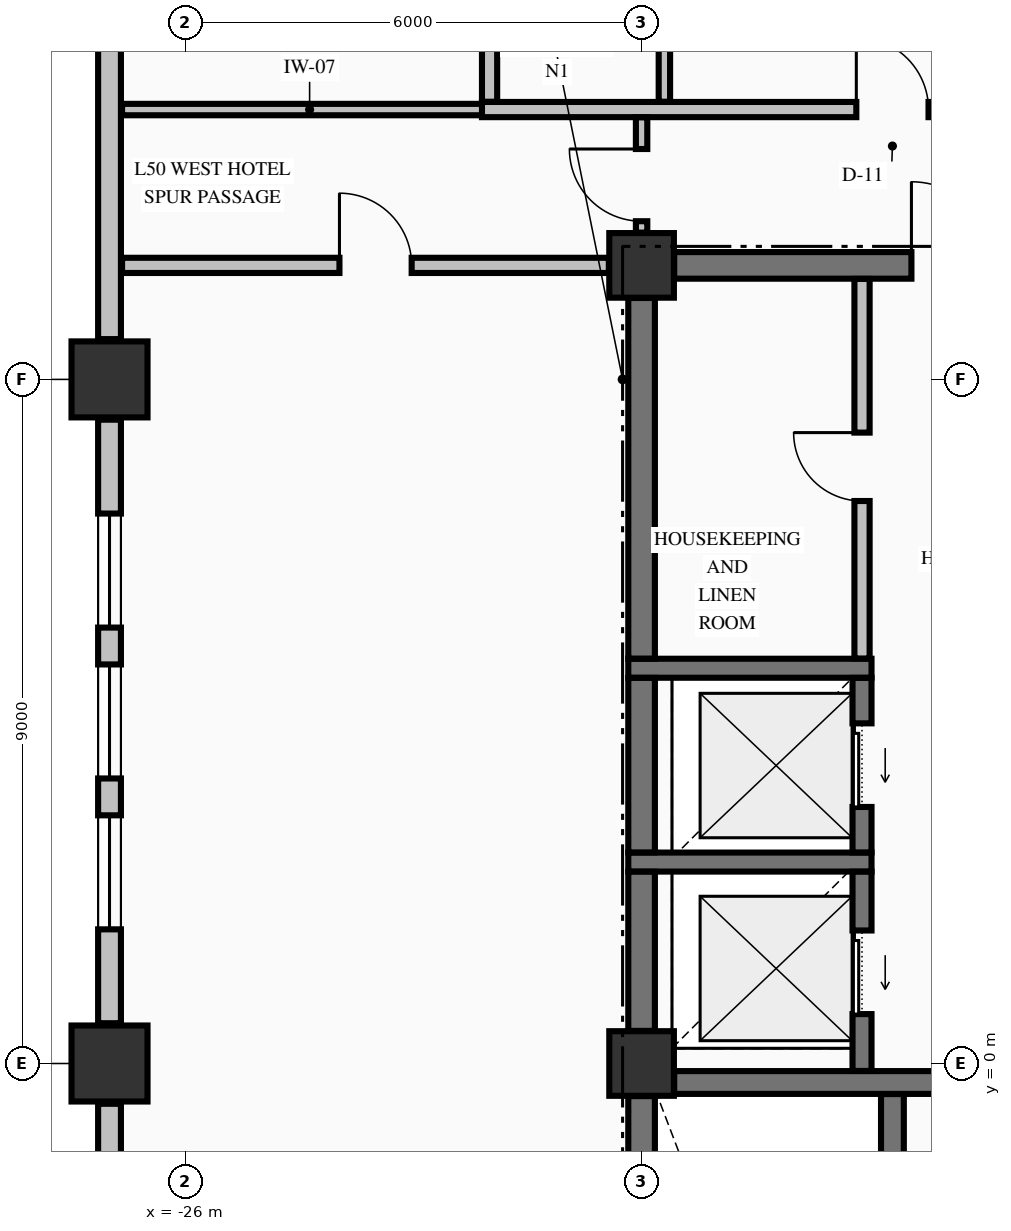
"""IFC4 building model, lengths in metres.
Left out: names, types, materials, properties, quantities, classifications, styles, units other than length and angle.
Written with IfcOpenShell. Run it as: python <this file> out.ifc"""

import sys

from ifc_helpers import new_model, si_unit, direction, frame, frame_2d, origin, origin_2d, place, context, subcontext, project, spatial, rectangle, extrude, element, fill, save


model = new_model("IFC4")
c1 = context("Model", 3, precision=1e-05, world=origin(), true_north=direction((0.0, 1.0)))
c2 = subcontext(c1, "Body", "Model", "MODEL_VIEW")
j1 = project(units=[si_unit("LENGTHUNIT", "METRE"), si_unit("PLANEANGLEUNIT", "RADIAN")], contexts=[c1])
p1 = place(None, origin())
s1 = spatial("IfcSite", under=j1, at=p1, CompositionType="ELEMENT")
p2 = place(p1, origin())
s2 = spatial("IfcBuilding", under=s1, at=p2, CompositionType="ELEMENT")
p3 = place(p2, frame((0.0, 0.0, 194.86)))
s3 = spatial("IfcBuildingStorey", under=s2, at=p3, CompositionType="ELEMENT", Elevation=194.86)
for number, where, z_axis, x_axis in (
    (1, (-27.0, 0.0, -0.275), (0.0, 0.0, 1.0), (1.0, 0.0, 0.0)),
    (2, (-27.0, 9.0, -0.275), (0.0, 0.0, 1.0), (1.0, 0.0, 0.0)),
):
    element("IfcColumn", number, at=place(p3, frame(where, z_axis=z_axis, x_axis=x_axis)), inside=s3, PredefinedType="COLUMN", context=c2, shape_type="SweptSolid", body=[
        extrude(rectangle(XDim=1.0, YDim=1.0, at=origin_2d()), origin(), (0.0, 0.0, 1.0), 3.425),
    ])
for number, where, z_axis, x_axis in (
    (3, (-20.0, 10.5, -0.275), (0.0, 0.0, 1.0), (1.0, 0.0, 0.0)),
    (4, (-20.0, 0.0, -0.275), (0.0, 0.0, 1.0), (1.0, 0.0, 0.0)),
):
    element("IfcColumn", number, at=place(p3, frame(where, z_axis=z_axis, x_axis=x_axis)), inside=s3, PredefinedType="COLUMN", context=c2, shape_type="SweptSolid", body=[
        extrude(rectangle(XDim=0.85, YDim=0.85, at=origin_2d()), origin(), (0.0, 0.0, 1.0), 3.425),
    ])
p4 = place(p3, frame((-27.0, -0.53, 0.0), z_axis=(0.0, 0.0, 1.0), x_axis=(0.0, -1.0, 0.0)))
e5 = element("IfcWall", 5, at=p4, inside=s3, PredefinedType="STANDARD", context=c2, shape_type="SweptSolid", body=[
    extrude(rectangle(XDim=7.94, YDim=0.3, at=frame_2d((3.97, 0.0))), origin(), (0.0, 0.0, 1.0), 2.542),
])
p5 = place(p4, frame((1.235, 0.0, 0.72)))
e6 = element("IfcOpeningElement", 6, at=p5, cuts=e5, PredefinedType="OPENING", context=c2, shape_type="SweptSolid", body=[
    extrude(rectangle(XDim=1.5, YDim=1.6, at=frame_2d((0.75, 0.8))), frame((0.0, 0.16, 0.0), z_axis=(0.0, -1.0, 0.0), x_axis=(1.0, 0.0, 0.0)), (0.0, 0.0, 1.0), 0.32),
])
p6 = place(p4, frame((3.22, 0.0, 0.72)))
e7 = element("IfcOpeningElement", 7, at=p6, cuts=e5, PredefinedType="OPENING", context=c2, shape_type="SweptSolid", body=[
    extrude(rectangle(XDim=1.5, YDim=1.6, at=frame_2d((0.75, 0.8))), frame((0.0, 0.16, 0.0), z_axis=(0.0, -1.0, 0.0), x_axis=(1.0, 0.0, 0.0)), (0.0, 0.0, 1.0), 0.32),
])
p7 = place(p4, frame((5.205, 0.0, 0.72)))
e8 = element("IfcOpeningElement", 8, at=p7, cuts=e5, PredefinedType="OPENING", context=c2, shape_type="SweptSolid", body=[
    extrude(rectangle(XDim=1.5, YDim=1.6, at=frame_2d((0.75, 0.8))), frame((0.0, 0.16, 0.0), z_axis=(0.0, -1.0, 0.0), x_axis=(1.0, 0.0, 0.0)), (0.0, 0.0, 1.0), 0.32),
])
p8 = place(p3, frame((-27.0, 8.47, 0.0), z_axis=(0.0, 0.0, 1.0), x_axis=(0.0, -1.0, 0.0)))
e9 = element("IfcWall", 9, at=p8, inside=s3, PredefinedType="STANDARD", context=c2, shape_type="SweptSolid", body=[
    extrude(rectangle(XDim=7.94, YDim=0.3, at=frame_2d((3.97, 0.0))), origin(), (0.0, 0.0, 1.0), 2.542),
])
p9 = place(p8, frame((1.235, 0.0, 0.72)))
e10 = element("IfcOpeningElement", 10, at=p9, cuts=e9, PredefinedType="OPENING", context=c2, shape_type="SweptSolid", body=[
    extrude(rectangle(XDim=1.5, YDim=1.6, at=frame_2d((0.75, 0.8))), frame((0.0, 0.16, 0.0), z_axis=(0.0, -1.0, 0.0), x_axis=(1.0, 0.0, 0.0)), (0.0, 0.0, 1.0), 0.32),
])
p10 = place(p8, frame((3.22, 0.0, 0.72)))
e11 = element("IfcOpeningElement", 11, at=p10, cuts=e9, PredefinedType="OPENING", context=c2, shape_type="SweptSolid", body=[
    extrude(rectangle(XDim=1.5, YDim=1.6, at=frame_2d((0.75, 0.8))), frame((0.0, 0.16, 0.0), z_axis=(0.0, -1.0, 0.0), x_axis=(1.0, 0.0, 0.0)), (0.0, 0.0, 1.0), 0.32),
])
p11 = place(p8, frame((5.205, 0.0, 0.72)))
e12 = element("IfcOpeningElement", 12, at=p11, cuts=e9, PredefinedType="OPENING", context=c2, shape_type="SweptSolid", body=[
    extrude(rectangle(XDim=1.5, YDim=1.6, at=frame_2d((0.75, 0.8))), frame((0.0, 0.16, 0.0), z_axis=(0.0, -1.0, 0.0), x_axis=(1.0, 0.0, 0.0)), (0.0, 0.0, 1.0), 0.32),
])
p12 = place(p3, frame((-27.0, 18.97, 0.0), z_axis=(0.0, 0.0, 1.0), x_axis=(0.0, -1.0, 0.0)))
e13 = element("IfcWall", 13, at=p12, inside=s3, PredefinedType="STANDARD", context=c2, shape_type="SweptSolid", body=[
    extrude(rectangle(XDim=9.44, YDim=0.3, at=frame_2d((4.72, 0.0))), origin(), (0.0, 0.0, 1.0), 2.542),
])
p13 = place(p3, frame((-19.571, -0.25, 0.0), z_axis=(0.0, 0.0, 1.0), x_axis=(1.0, 0.0, 0.0)))
e14 = element("IfcWall", 14, at=p13, inside=s3, PredefinedType="SHEAR", context=c2, shape_type="SweptSolid", body=[
    extrude(rectangle(XDim=8.142, YDim=0.3, at=frame_2d((4.071, 0.0))), origin(), (0.0, 0.0, 1.0), 3.15),
])
p14 = place(p13, frame((5.871, 0.0, 0.0)))
e15 = element("IfcOpeningElement", 15, at=p14, cuts=e14, PredefinedType="OPENING", context=c2, shape_type="SweptSolid", body=[
    extrude(rectangle(XDim=1.1, YDim=2.15, at=frame_2d((0.55, 1.075))), frame((0.0, 0.16, 0.0), z_axis=(0.0, -1.0, 0.0), x_axis=(1.0, 0.0, 0.0)), (0.0, 0.0, 1.0), 0.32),
])
for number, where, z_axis, x_axis in (
    (16, (-20.175, 2.65, 0.0), (0.0, 0.0, 1.0), (1.0, 0.0, 0.0)),
    (17, (-20.175, 5.2, 0.0), (0.0, 0.0, 1.0), (1.0, 0.0, 0.0)),
):
    element("IfcWall", number, at=place(p3, frame(where, z_axis=z_axis, x_axis=x_axis)), inside=s3, PredefinedType="SOLIDWALL", context=c2, shape_type="SweptSolid", body=[
        extrude(rectangle(XDim=3.2, YDim=0.25, at=frame_2d((1.6, 0.0))), origin(), (0.0, 0.0, 1.0), 3.15),
    ])
p15 = place(p3, frame((-19.571, 10.5, 0.0), z_axis=(0.0, 0.0, 1.0), x_axis=(1.0, 0.0, 0.0)))
e18 = element("IfcWall", 18, at=p15, inside=s3, PredefinedType="SHEAR", context=c2, shape_type="SweptSolid", body=[
    extrude(rectangle(XDim=4.871, YDim=0.35, at=frame_2d((2.436, 0.0))), origin(), (0.0, 0.0, 1.0), 3.15),
])
p16 = place(p15, frame((3.121, 0.0, 0.0)))
e19 = element("IfcOpeningElement", 19, at=p16, cuts=e18, PredefinedType="OPENING", context=c2, shape_type="SweptSolid", body=[
    extrude(rectangle(XDim=1.1, YDim=2.15, at=frame_2d((0.55, 1.075))), frame((0.0, 0.185, 0.0), z_axis=(0.0, -1.0, 0.0), x_axis=(1.0, 0.0, 0.0)), (0.0, 0.0, 1.0), 0.37),
])
p17 = place(p3, frame((-26.835, 10.5, 0.0), z_axis=(0.0, 0.0, 1.0), x_axis=(1.0, 0.0, 0.0)))
e20 = element("IfcWall", 20, at=p17, inside=s3, PredefinedType="PARTITIONING", context=c2, shape_type="SweptSolid", body=[
    extrude(rectangle(XDim=6.404, YDim=0.2, at=frame_2d((3.202, 0.0))), origin(), (0.0, 0.0, 1.0), 3.15),
])
p18 = place(p17, frame((2.86, 0.0, 0.0)))
e21 = element("IfcOpeningElement", 21, at=p18, cuts=e20, PredefinedType="OPENING", context=c2, shape_type="SweptSolid", body=[
    extrude(rectangle(XDim=0.95, YDim=2.15, at=frame_2d((0.475, 1.075))), frame((0.0, 0.11, 0.0), z_axis=(0.0, -1.0, 0.0), x_axis=(1.0, 0.0, 0.0)), (0.0, 0.0, 1.0), 0.22),
])
p19 = place(p3, frame((-26.835, 12.55, 0.0), z_axis=(0.0, 0.0, 1.0), x_axis=(1.0, 0.0, 0.0)))
e22 = element("IfcWall", 22, at=p19, inside=s3, PredefinedType="PARTITIONING", context=c2, shape_type="SweptSolid", body=[
    extrude(rectangle(XDim=4.935, YDim=0.15, at=frame_2d((2.468, 0.0))), origin(), (0.0, 0.0, 1.0), 3.15),
])
p20 = place(p3, frame((-22.1, 12.55, 0.0), z_axis=(0.0, 0.0, 1.0), x_axis=(1.0, 0.0, 0.0)))
e23 = element("IfcWall", 23, at=p20, inside=s3, PredefinedType="PARTITIONING", context=c2, shape_type="SweptSolid", body=[
    extrude(rectangle(XDim=39.2, YDim=0.2, at=frame_2d((19.6, 0.0))), origin(), (0.0, 0.0, 1.0), 3.15),
])
p21 = place(p20, frame((4.925, 0.0, 0.0)))
e24 = element("IfcOpeningElement", 24, at=p21, cuts=e23, PredefinedType="OPENING", context=c2, shape_type="SweptSolid", body=[
    extrude(rectangle(XDim=0.95, YDim=2.15, at=frame_2d((0.475, 1.075))), frame((0.0, 0.11, 0.0), z_axis=(0.0, -1.0, 0.0), x_axis=(1.0, 0.0, 0.0)), (0.0, 0.0, 1.0), 0.22),
])
p22 = place(p20, frame((12.375, 0.0, 0.0)))
e25 = element("IfcOpeningElement", 25, at=p22, cuts=e23, PredefinedType="OPENING", context=c2, shape_type="SweptSolid", body=[
    extrude(rectangle(XDim=0.95, YDim=2.15, at=frame_2d((0.475, 1.075))), frame((0.0, 0.11, 0.0), z_axis=(0.0, -1.0, 0.0), x_axis=(1.0, 0.0, 0.0)), (0.0, 0.0, 1.0), 0.22),
])
p23 = place(p20, frame((18.575, 0.0, 0.0)))
e26 = element("IfcOpeningElement", 26, at=p23, cuts=e23, PredefinedType="OPENING", context=c2, shape_type="SweptSolid", body=[
    extrude(rectangle(XDim=0.95, YDim=2.15, at=frame_2d((0.475, 1.075))), frame((0.0, 0.11, 0.0), z_axis=(0.0, -1.0, 0.0), x_axis=(1.0, 0.0, 0.0)), (0.0, 0.0, 1.0), 0.22),
])
p24 = place(p20, frame((24.475, 0.0, 0.0)))
e27 = element("IfcOpeningElement", 27, at=p24, cuts=e23, PredefinedType="OPENING", context=c2, shape_type="SweptSolid", body=[
    extrude(rectangle(XDim=0.95, YDim=2.15, at=frame_2d((0.475, 1.075))), frame((0.0, 0.11, 0.0), z_axis=(0.0, -1.0, 0.0), x_axis=(1.0, 0.0, 0.0)), (0.0, 0.0, 1.0), 0.22),
])
p25 = place(p20, frame((30.375, 0.0, 0.0)))
e28 = element("IfcOpeningElement", 28, at=p25, cuts=e23, PredefinedType="OPENING", context=c2, shape_type="SweptSolid", body=[
    extrude(rectangle(XDim=0.95, YDim=2.15, at=frame_2d((0.475, 1.075))), frame((0.0, 0.11, 0.0), z_axis=(0.0, -1.0, 0.0), x_axis=(1.0, 0.0, 0.0)), (0.0, 0.0, 1.0), 0.22),
])
p26 = place(p20, frame((36.525, 0.0, 0.0)))
e29 = element("IfcOpeningElement", 29, at=p26, cuts=e23, PredefinedType="OPENING", context=c2, shape_type="SweptSolid", body=[
    extrude(rectangle(XDim=0.95, YDim=2.15, at=frame_2d((0.475, 1.075))), frame((0.0, 0.11, 0.0), z_axis=(0.0, -1.0, 0.0), x_axis=(1.0, 0.0, 0.0)), (0.0, 0.0, 1.0), 0.22),
])
p27 = place(p3, frame((-20.0, -9.521, 0.0), z_axis=(0.0, 0.0, 1.0), x_axis=(0.0, 1.0, 0.0)))
e30 = element("IfcWall", 30, at=p27, inside=s3, PredefinedType="SHEAR", context=c2, shape_type="SweptSolid", body=[
    extrude(rectangle(XDim=9.092, YDim=0.35, at=frame_2d((4.546, 0.0))), origin(), (0.0, 0.0, 1.0), 3.15),
])
p28 = place(p3, frame((-20.0, 0.429, 0.0), z_axis=(0.0, 0.0, 1.0), x_axis=(0.0, 1.0, 0.0)))
e31 = element("IfcWall", 31, at=p28, inside=s3, PredefinedType="SHEAR", context=c2, shape_type="SweptSolid", body=[
    extrude(rectangle(XDim=2.094, YDim=0.35, at=frame_2d((1.047, 0.0))), origin(), (0.0, 0.0, 1.0), 3.15),
])
p29 = place(p3, frame((-20.0, 2.777, 0.0), z_axis=(0.0, 0.0, 1.0), x_axis=(0.0, 1.0, 0.0)))
e32 = element("IfcWall", 32, at=p29, inside=s3, PredefinedType="SHEAR", context=c2, shape_type="SweptSolid", body=[
    extrude(rectangle(XDim=2.296, YDim=0.35, at=frame_2d((1.148, 0.0))), origin(), (0.0, 0.0, 1.0), 3.15),
])
p30 = place(p3, frame((-20.0, 5.327, 0.0), z_axis=(0.0, 0.0, 1.0), x_axis=(0.0, 1.0, 0.0)))
e33 = element("IfcWall", 33, at=p30, inside=s3, PredefinedType="SHEAR", context=c2, shape_type="SweptSolid", body=[
    extrude(rectangle(XDim=4.744, YDim=0.35, at=frame_2d((2.372, 0.0))), origin(), (0.0, 0.0, 1.0), 3.15),
])
p31 = place(p3, frame((-17.1, -0.098, 0.0), z_axis=(0.0, 0.0, 1.0), x_axis=(0.0, 1.0, 0.0)))
e34 = element("IfcWall", 34, at=p31, inside=s3, PredefinedType="SOLIDWALL", context=c2, shape_type="SweptSolid", body=[
    extrude(rectangle(XDim=2.621, YDim=0.25, at=frame_2d((1.311, 0.0))), origin(), (0.0, 0.0, 1.0), 3.15),
])
p32 = place(p31, frame((0.748, 0.0, 0.0)))
e35 = element("IfcOpeningElement", 35, at=p32, cuts=e34, PredefinedType="OPENING", context=c2, shape_type="SweptSolid", body=[
    extrude(rectangle(XDim=1.1, YDim=2.2, at=frame_2d((0.55, 1.1))), frame((0.0, 0.135, 0.0), z_axis=(0.0, -1.0, 0.0), x_axis=(1.0, 0.0, 0.0)), (0.0, 0.0, 1.0), 0.27),
])
p33 = place(p3, frame((-17.1, 2.777, 0.0), z_axis=(0.0, 0.0, 1.0), x_axis=(0.0, 1.0, 0.0)))
e36 = element("IfcWall", 36, at=p33, inside=s3, PredefinedType="SOLIDWALL", context=c2, shape_type="SweptSolid", body=[
    extrude(rectangle(XDim=2.296, YDim=0.25, at=frame_2d((1.148, 0.0))), origin(), (0.0, 0.0, 1.0), 3.15),
])
p34 = place(p33, frame((0.598, 0.0, 0.0)))
e37 = element("IfcOpeningElement", 37, at=p34, cuts=e36, PredefinedType="OPENING", context=c2, shape_type="SweptSolid", body=[
    extrude(rectangle(XDim=1.1, YDim=2.2, at=frame_2d((0.55, 1.1))), frame((0.0, 0.135, 0.0), z_axis=(0.0, -1.0, 0.0), x_axis=(1.0, 0.0, 0.0)), (0.0, 0.0, 1.0), 0.27),
])
p35 = place(p3, frame((-16.7, -9.773, 0.0), z_axis=(0.0, 0.0, 1.0), x_axis=(0.0, 1.0, 0.0)))
e38 = element("IfcWall", 38, at=p35, inside=s3, PredefinedType="SHEAR", context=c2, shape_type="SweptSolid", body=[
    extrude(rectangle(XDim=9.371, YDim=0.3, at=frame_2d((4.686, 0.0))), origin(), (0.0, 0.0, 1.0), 3.15),
])
p36 = place(p3, frame((-22.0, 12.653, 0.0), z_axis=(0.0, 0.0, 1.0), x_axis=(0.0, 1.0, 0.0)))
e39 = element("IfcWall", 39, at=p36, inside=s3, PredefinedType="PARTITIONING", context=c2, shape_type="SweptSolid", body=[
    extrude(rectangle(XDim=2.669, YDim=0.2, at=frame_2d((1.334, 0.0))), origin(), (0.0, 0.0, 1.0), 3.15),
])
p37 = place(p3, frame((-20.0, 10.931, 0.0), z_axis=(0.0, 0.0, 1.0), x_axis=(0.0, 1.0, 0.0)))
e40 = element("IfcWall", 40, at=p37, inside=s3, PredefinedType="PARTITIONING", context=c2, shape_type="SweptSolid", body=[
    extrude(rectangle(XDim=1.516, YDim=0.15, at=frame_2d((0.758, 0.0))), origin(), (0.0, 0.0, 1.0), 2.342),
])
p38 = place(p37, frame((0.15, 0.0, 0.0)))
e41 = element("IfcOpeningElement", 41, at=p38, cuts=e40, PredefinedType="OPENING", context=c2, shape_type="SweptSolid", body=[
    extrude(rectangle(XDim=0.95, YDim=2.15, at=frame_2d((0.475, 1.075))), frame((0.0, 0.085, 0.0), z_axis=(0.0, -1.0, 0.0), x_axis=(1.0, 0.0, 0.0)), (0.0, 0.0, 1.0), 0.17),
])
p39 = place(p3, frame((-19.7, 12.653, 0.0), z_axis=(0.0, 0.0, 1.0), x_axis=(0.0, 1.0, 0.0)))
e42 = element("IfcWall", 42, at=p39, inside=s3, PredefinedType="PARTITIONING", context=c2, shape_type="SweptSolid", body=[
    extrude(rectangle(XDim=2.669, YDim=0.15, at=frame_2d((1.334, 0.0))), origin(), (0.0, 0.0, 1.0), 2.342),
])
p40 = place(p3, frame((-17.1, 5.328, 0.0), z_axis=(0.0, 0.0, 1.0), x_axis=(0.0, 1.0, 0.0)))
e43 = element("IfcWall", 43, at=p40, inside=s3, PredefinedType="PARTITIONING", context=c2, shape_type="SweptSolid", body=[
    extrude(rectangle(XDim=4.994, YDim=0.2, at=frame_2d((2.497, 0.0))), origin(), (0.0, 0.0, 1.0), 3.15),
])
p41 = place(p40, frame((2.072, 0.0, 0.0)))
e44 = element("IfcOpeningElement", 44, at=p41, cuts=e43, PredefinedType="OPENING", context=c2, shape_type="SweptSolid", body=[
    extrude(rectangle(XDim=0.9, YDim=2.15, at=frame_2d((0.45, 1.075))), frame((0.0, 0.11, 0.0), z_axis=(0.0, -1.0, 0.0), x_axis=(1.0, 0.0, 0.0)), (0.0, 0.0, 1.0), 0.22),
])
p42 = place(p9, origin())
e45 = element("IfcWindow", 45, at=p42, inside=s3, PartitioningType="SINGLE_PANEL", PredefinedType="WINDOW", context=c2, shape_type="SweptSolid", body=[
    extrude(rectangle(XDim=1.5, YDim=1.6, at=frame_2d((0.75, 0.8))), frame((0.0, 0.03, 0.0), z_axis=(0.0, -1.0, 0.0), x_axis=(1.0, 0.0, 0.0)), (0.0, 0.0, 1.0), 0.06),
])
fill(e10, e45)
p43 = place(p10, origin())
e46 = element("IfcWindow", 46, at=p43, inside=s3, PartitioningType="SINGLE_PANEL", PredefinedType="WINDOW", context=c2, shape_type="SweptSolid", body=[
    extrude(rectangle(XDim=1.5, YDim=1.6, at=frame_2d((0.75, 0.8))), frame((0.0, 0.03, 0.0), z_axis=(0.0, -1.0, 0.0), x_axis=(1.0, 0.0, 0.0)), (0.0, 0.0, 1.0), 0.06),
])
fill(e11, e46)
p44 = place(p11, origin())
e47 = element("IfcWindow", 47, at=p44, inside=s3, PartitioningType="SINGLE_PANEL", PredefinedType="WINDOW", context=c2, shape_type="SweptSolid", body=[
    extrude(rectangle(XDim=1.5, YDim=1.6, at=frame_2d((0.75, 0.8))), frame((0.0, 0.03, 0.0), z_axis=(0.0, -1.0, 0.0), x_axis=(1.0, 0.0, 0.0)), (0.0, 0.0, 1.0), 0.06),
])
fill(e12, e47)
p45 = place(p32, origin())
e48 = element("IfcDoor", 48, at=p45, inside=s3, OperationType="SLIDING_TO_LEFT", PredefinedType="DOOR", context=c2, shape_type="SweptSolid", body=[
    extrude(rectangle(XDim=1.1, YDim=2.2, at=frame_2d((0.55, 1.1))), frame((0.0, 0.025, 0.0), z_axis=(0.0, -1.0, 0.0), x_axis=(1.0, 0.0, 0.0)), (0.0, 0.0, 1.0), 0.05),
])
fill(e35, e48)
p46 = place(p34, origin())
e49 = element("IfcDoor", 49, at=p46, inside=s3, OperationType="SLIDING_TO_LEFT", PredefinedType="DOOR", context=c2, shape_type="SweptSolid", body=[
    extrude(rectangle(XDim=1.1, YDim=2.2, at=frame_2d((0.55, 1.1))), frame((0.0, 0.025, 0.0), z_axis=(0.0, -1.0, 0.0), x_axis=(1.0, 0.0, 0.0)), (0.0, 0.0, 1.0), 0.05),
])
fill(e37, e49)
p47 = place(p16, origin())
e50 = element("IfcDoor", 50, at=p47, inside=s3, OperationType="SINGLE_SWING_LEFT", PredefinedType="DOOR", context=c2, shape_type="SweptSolid", body=[
    extrude(rectangle(XDim=1.1, YDim=2.15, at=frame_2d((0.55, 1.075))), frame((0.0, 0.025, 0.0), z_axis=(0.0, -1.0, 0.0), x_axis=(1.0, 0.0, 0.0)), (0.0, 0.0, 1.0), 0.05),
])
fill(e19, e50)
p48 = place(p41, origin())
e51 = element("IfcDoor", 51, at=p48, inside=s3, OperationType="SINGLE_SWING_RIGHT", PredefinedType="DOOR", context=c2, shape_type="SweptSolid", body=[
    extrude(rectangle(XDim=0.9, YDim=2.15, at=frame_2d((0.45, 1.075))), frame((0.0, 0.025, 0.0), z_axis=(0.0, -1.0, 0.0), x_axis=(1.0, 0.0, 0.0)), (0.0, 0.0, 1.0), 0.05),
])
fill(e44, e51)
p49 = place(p21, origin())
e52 = element("IfcDoor", 52, at=p49, inside=s3, OperationType="SINGLE_SWING_LEFT", PredefinedType="DOOR", context=c2, shape_type="SweptSolid", body=[
    extrude(rectangle(XDim=0.95, YDim=2.15, at=frame_2d((0.475, 1.075))), frame((0.0, 0.025, 0.0), z_axis=(0.0, -1.0, 0.0), x_axis=(1.0, 0.0, 0.0)), (0.0, 0.0, 1.0), 0.05),
])
fill(e24, e52)
p50 = place(p38, origin())
e53 = element("IfcDoor", 53, at=p50, inside=s3, OperationType="SINGLE_SWING_RIGHT", PredefinedType="DOOR", context=c2, shape_type="SweptSolid", body=[
    extrude(rectangle(XDim=0.95, YDim=2.15, at=frame_2d((0.475, 1.075))), frame((0.0, 0.025, 0.0), z_axis=(0.0, -1.0, 0.0), x_axis=(1.0, 0.0, 0.0)), (0.0, 0.0, 1.0), 0.05),
])
fill(e41, e53)
p51 = place(p18, origin())
e54 = element("IfcDoor", 54, at=p51, inside=s3, OperationType="SINGLE_SWING_LEFT", PredefinedType="DOOR", context=c2, shape_type="SweptSolid", body=[
    extrude(rectangle(XDim=0.95, YDim=2.15, at=frame_2d((0.475, 1.075))), frame((0.0, 0.025, 0.0), z_axis=(0.0, -1.0, 0.0), x_axis=(1.0, 0.0, 0.0)), (0.0, 0.0, 1.0), 0.05),
])
fill(e21, e54)
save(model, sys.argv[1])
